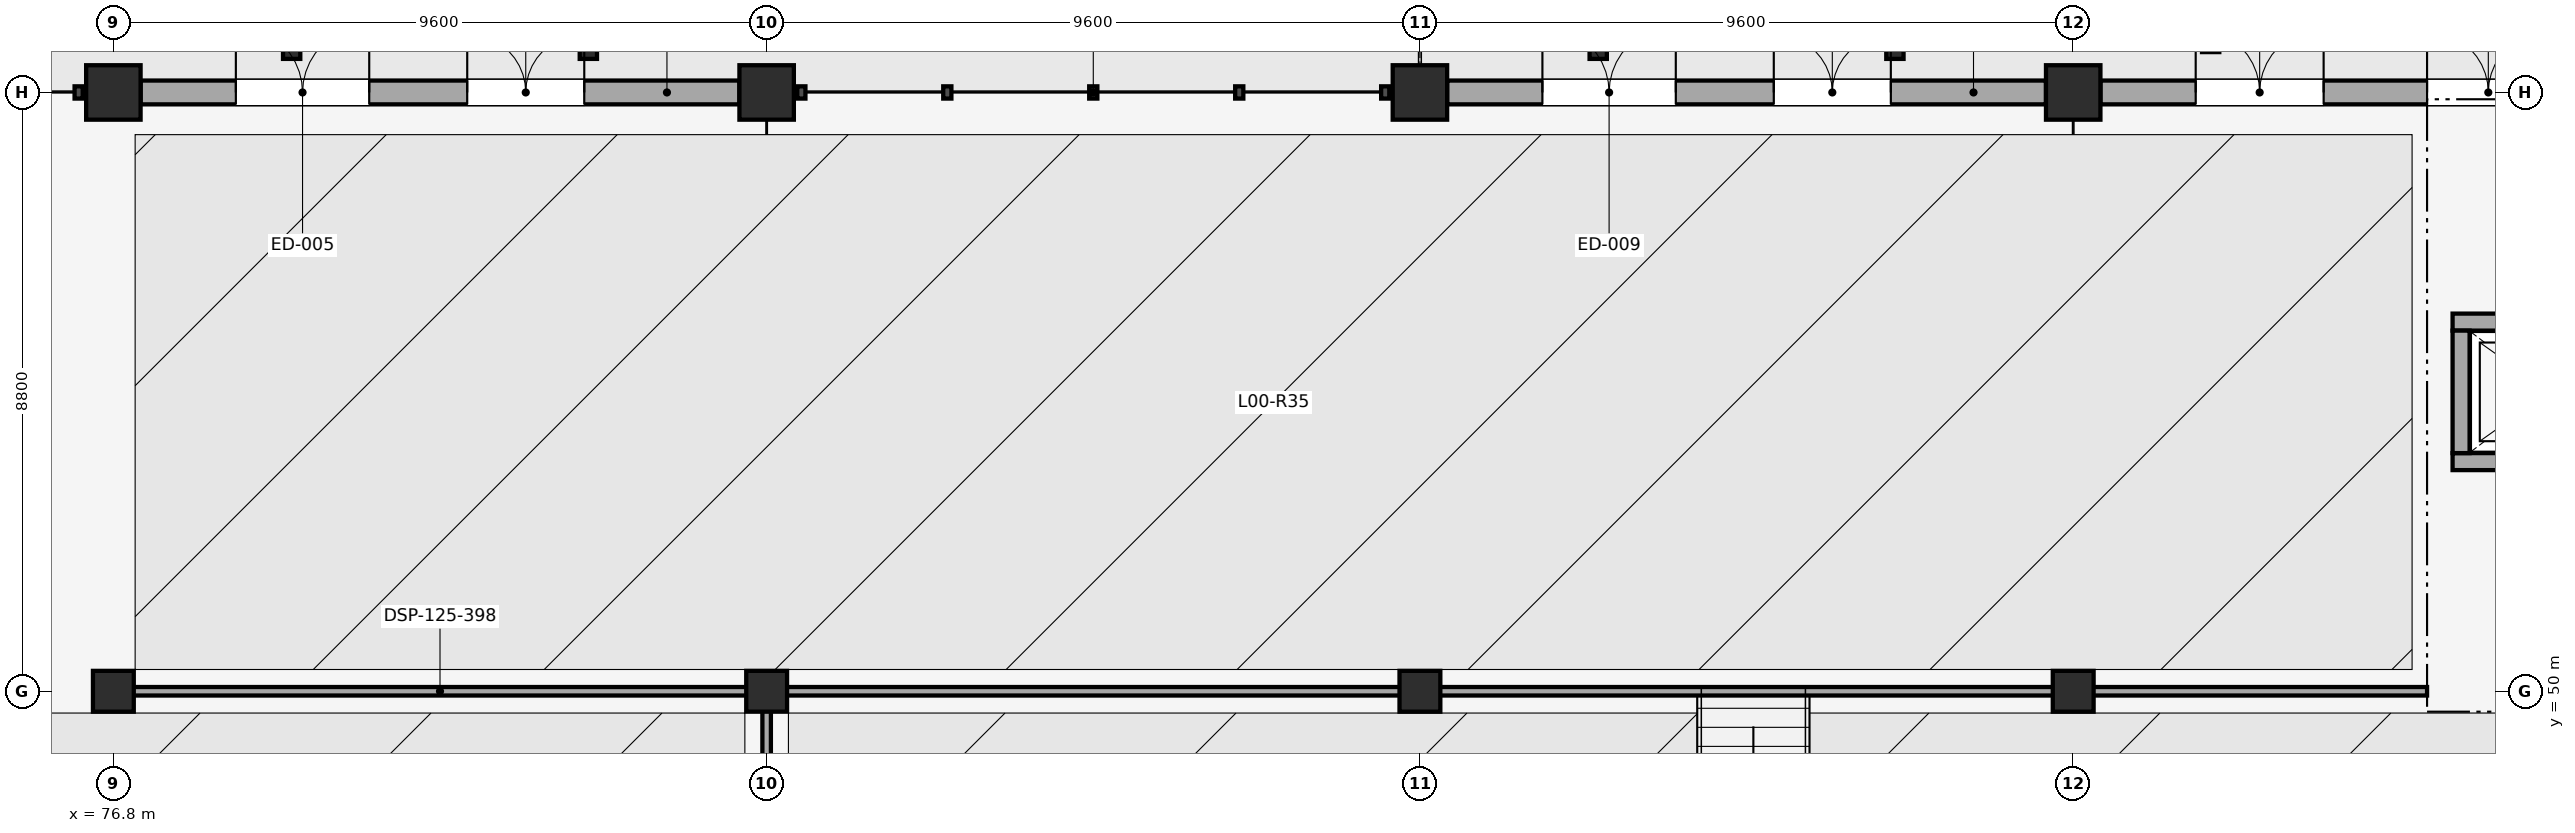
"""IFC4 building model, lengths in metres.
Left out: names, types, materials, properties, quantities, classifications, styles, units other than length and angle.
Written with IfcOpenShell. Run it as: python <this file> out.ifc"""

import sys

from ifc_helpers import new_model, si_unit, direction, frame, frame_2d, origin, origin_2d, place, context, subcontext, project, spatial, rectangle, hollow_rectangle, extrude, element, fill, save


model = new_model("IFC4")
c1 = context("Model", 3, precision=1e-05, world=origin(), true_north=direction((0.0, 1.0)))
c2 = subcontext(c1, "Body", "Model", "MODEL_VIEW")
j1 = project(units=[si_unit("LENGTHUNIT", "METRE"), si_unit("PLANEANGLEUNIT", "RADIAN")], contexts=[c1])
p1 = place(None, origin())
s1 = spatial("IfcSite", under=j1, at=p1, CompositionType="ELEMENT")
p2 = place(p1, origin())
s2 = spatial("IfcBuilding", under=s1, at=p2, CompositionType="ELEMENT")
p3 = place(p2, origin())
s3 = spatial("IfcBuildingStorey", under=s2, at=p3, CompositionType="ELEMENT", Elevation=0.0)
p4 = place(p3, frame((76.8, 50.0, 0.0), z_axis=(0.0, 0.0, 1.0), x_axis=(1.0, 0.0, 0.0)))
e1 = element("IfcColumn", 1, at=p4, inside=s3, PredefinedType="COLUMN", context=c2, shape_type="SweptSolid", body=[
    extrude(rectangle(XDim=0.6, YDim=0.6, at=origin_2d()), origin(), (0.0, 0.0, 1.0), 4.8),
])
p5 = place(p3, frame((76.8, 58.8, 0.0), z_axis=(0.0, 0.0, 1.0), x_axis=(1.0, 0.0, 0.0)))
e2 = element("IfcColumn", 2, at=p5, inside=s3, PredefinedType="COLUMN", context=c2, shape_type="SweptSolid", body=[
    extrude(rectangle(XDim=0.8, YDim=0.8, at=origin_2d()), origin(), (0.0, 0.0, 1.0), 4.8),
])
p6 = place(p3, frame((86.4, 50.0, 0.0), z_axis=(0.0, 0.0, 1.0), x_axis=(1.0, 0.0, 0.0)))
e3 = element("IfcColumn", 3, at=p6, inside=s3, PredefinedType="COLUMN", context=c2, shape_type="SweptSolid", body=[
    extrude(rectangle(XDim=0.6, YDim=0.6, at=origin_2d()), origin(), (0.0, 0.0, 1.0), 4.8),
])
p7 = place(p3, frame((86.4, 58.8, 0.0), z_axis=(0.0, 0.0, 1.0), x_axis=(1.0, 0.0, 0.0)))
e4 = element("IfcColumn", 4, at=p7, inside=s3, PredefinedType="COLUMN", context=c2, shape_type="SweptSolid", body=[
    extrude(rectangle(XDim=0.8, YDim=0.8, at=origin_2d()), origin(), (0.0, 0.0, 1.0), 4.8),
])
p8 = place(p3, frame((96.0, 50.0, 0.0), z_axis=(0.0, 0.0, 1.0), x_axis=(1.0, 0.0, 0.0)))
e5 = element("IfcColumn", 5, at=p8, inside=s3, PredefinedType="COLUMN", context=c2, shape_type="SweptSolid", body=[
    extrude(rectangle(XDim=0.6, YDim=0.6, at=origin_2d()), origin(), (0.0, 0.0, 1.0), 4.8),
])
p9 = place(p3, frame((96.0, 58.8, 0.0), z_axis=(0.0, 0.0, 1.0), x_axis=(1.0, 0.0, 0.0)))
e6 = element("IfcColumn", 6, at=p9, inside=s3, PredefinedType="COLUMN", context=c2, shape_type="SweptSolid", body=[
    extrude(rectangle(XDim=0.8, YDim=0.8, at=origin_2d()), origin(), (0.0, 0.0, 1.0), 4.8),
])
p10 = place(p3, frame((105.6, 50.0, 0.0), z_axis=(0.0, 0.0, 1.0), x_axis=(1.0, 0.0, 0.0)))
e7 = element("IfcColumn", 7, at=p10, inside=s3, PredefinedType="COLUMN", context=c2, shape_type="SweptSolid", body=[
    extrude(rectangle(XDim=0.6, YDim=0.6, at=origin_2d()), origin(), (0.0, 0.0, 1.0), 4.8),
])
p11 = place(p3, frame((105.6, 58.8, 0.0), z_axis=(0.0, 0.0, 1.0), x_axis=(1.0, 0.0, 0.0)))
e8 = element("IfcColumn", 8, at=p11, inside=s3, PredefinedType="COLUMN", context=c2, shape_type="SweptSolid", body=[
    extrude(rectangle(XDim=0.8, YDim=0.8, at=origin_2d()), origin(), (0.0, 0.0, 1.0), 4.8),
])
p12 = place(p3, frame((77.2, 58.8, 0.0), z_axis=(0.0, 0.0, 1.0), x_axis=(1.0, 0.0, 0.0)))
e9 = element("IfcWall", 9, at=p12, inside=s3, PredefinedType="SOLIDWALL", context=c2, shape_type="SweptSolid", body=[
    extrude(rectangle(XDim=8.8, YDim=0.35, at=frame_2d((4.4, 0.0))), origin(), (0.0, 0.0, 1.0), 4.1),
])
p13 = place(p12, frame((1.4, 0.0, 0.0)))
e10 = element("IfcOpeningElement", 10, at=p13, cuts=e9, PredefinedType="OPENING", context=c2, shape_type="SweptSolid", body=[
    extrude(rectangle(XDim=1.96, YDim=2.37, at=frame_2d((0.98, 1.185))), frame((0.0, 0.185, 0.0), z_axis=(0.0, -1.0, 0.0), x_axis=(1.0, 0.0, 0.0)), (0.0, 0.0, 1.0), 0.37),
])
p14 = place(p12, frame((4.8, 0.0, 0.0)))
e11 = element("IfcOpeningElement", 11, at=p14, cuts=e9, PredefinedType="OPENING", context=c2, shape_type="SweptSolid", body=[
    extrude(rectangle(XDim=1.72, YDim=2.34, at=frame_2d((0.86, 1.17))), frame((0.0, 0.185, 0.0), z_axis=(0.0, -1.0, 0.0), x_axis=(1.0, 0.0, 0.0)), (0.0, 0.0, 1.0), 0.37),
])
p15 = place(p3, frame((96.4, 58.8, 0.0), z_axis=(0.0, 0.0, 1.0), x_axis=(1.0, 0.0, 0.0)))
e12 = element("IfcWall", 12, at=p15, inside=s3, PredefinedType="SOLIDWALL", context=c2, shape_type="SweptSolid", body=[
    extrude(rectangle(XDim=8.8, YDim=0.35, at=frame_2d((4.4, 0.0))), origin(), (0.0, 0.0, 1.0), 4.1),
])
p16 = place(p15, frame((1.4, 0.0, 0.0)))
e13 = element("IfcOpeningElement", 13, at=p16, cuts=e12, PredefinedType="OPENING", context=c2, shape_type="SweptSolid", body=[
    extrude(rectangle(XDim=1.96, YDim=2.37, at=frame_2d((0.98, 1.185))), frame((0.0, 0.185, 0.0), z_axis=(0.0, -1.0, 0.0), x_axis=(1.0, 0.0, 0.0)), (0.0, 0.0, 1.0), 0.37),
])
p17 = place(p15, frame((4.8, 0.0, 0.0)))
e14 = element("IfcOpeningElement", 14, at=p17, cuts=e12, PredefinedType="OPENING", context=c2, shape_type="SweptSolid", body=[
    extrude(rectangle(XDim=1.72, YDim=2.34, at=frame_2d((0.86, 1.17))), frame((0.0, 0.185, 0.0), z_axis=(0.0, -1.0, 0.0), x_axis=(1.0, 0.0, 0.0)), (0.0, 0.0, 1.0), 0.37),
])
p18 = place(p3, frame((106.0, 58.8, 0.0), z_axis=(0.0, 0.0, 1.0), x_axis=(1.0, 0.0, 0.0)))
e15 = element("IfcWall", 15, at=p18, inside=s3, PredefinedType="SOLIDWALL", context=c2, shape_type="SweptSolid", body=[
    extrude(rectangle(XDim=8.8, YDim=0.35, at=frame_2d((4.4, 0.0))), origin(), (0.0, 0.0, 1.0), 4.1),
])
p19 = place(p18, frame((1.4, 0.0, 0.0)))
e16 = element("IfcOpeningElement", 16, at=p19, cuts=e15, PredefinedType="OPENING", context=c2, shape_type="SweptSolid", body=[
    extrude(rectangle(XDim=1.88, YDim=2.31, at=frame_2d((0.94, 1.155))), frame((0.0, 0.185, 0.0), z_axis=(0.0, -1.0, 0.0), x_axis=(1.0, 0.0, 0.0)), (0.0, 0.0, 1.0), 0.37),
])
p20 = place(p18, frame((4.8, 0.0, 0.0)))
e17 = element("IfcOpeningElement", 17, at=p20, cuts=e15, PredefinedType="OPENING", context=c2, shape_type="SweptSolid", body=[
    extrude(rectangle(XDim=1.8, YDim=2.4, at=frame_2d((0.9, 1.2))), frame((0.0, 0.185, 0.0), z_axis=(0.0, -1.0, 0.0), x_axis=(1.0, 0.0, 0.0)), (0.0, 0.0, 1.0), 0.37),
])
for number, where, z_axis, x_axis in (
    (18, (79.42, 59.42, 0.0), (0.0, 0.0, 1.0), (1.0, 0.0, 0.0)),
    (19, (83.78, 59.42, 0.0), (0.0, 0.0, 1.0), (1.0, 0.0, 0.0)),
    (20, (98.62, 59.42, 0.0), (0.0, 0.0, 1.0), (1.0, 0.0, 0.0)),
    (21, (102.98, 59.42, 0.0), (0.0, 0.0, 1.0), (1.0, 0.0, 0.0)),
):
    element("IfcColumn", number, at=place(p3, frame(where, z_axis=z_axis, x_axis=x_axis)), inside=s3, PredefinedType="COLUMN", context=c2, shape_type="SweptSolid", body=[
        extrude(hollow_rectangle(XDim=0.254, YDim=0.254, WallThickness=0.012, at=origin_2d()), origin(), (0.0, 0.0, 1.0), 3.47),
    ])
p21 = place(p3, frame((107.62, 59.52, 0.0), z_axis=(0.0, 0.0, 1.0), x_axis=(1.0, 0.0, 0.0)))
e22 = element("IfcColumn", 22, at=p21, inside=s3, PredefinedType="COLUMN", context=c2, shape_type="SweptSolid", body=[
    extrude(hollow_rectangle(XDim=0.254, YDim=0.254, WallThickness=0.012, at=origin_2d()), origin(), (0.0, 0.0, 1.0), 3.56),
])
p22 = place(p3, frame((114.025, 53.375, 0.0), z_axis=(0.0, 0.0, 1.0), x_axis=(-1.0, 0.0, 0.0)))
e23 = element("IfcWall", 23, at=p22, inside=s3, PredefinedType="SOLIDWALL", context=c2, shape_type="SweptSolid", body=[
    extrude(rectangle(XDim=2.85, YDim=0.25, at=frame_2d((1.425, 0.0))), origin(), (0.0, 0.0, 1.0), 4.55),
])
p23 = place(p22, frame((0.875, 0.0, 0.0)))
e24 = element("IfcOpeningElement", 24, at=p23, cuts=e23, PredefinedType="OPENING", context=c2, shape_type="SweptSolid", body=[
    extrude(rectangle(XDim=1.1, YDim=2.15, at=frame_2d((0.55, 1.075))), frame((0.0, 0.135, 0.0), z_axis=(0.0, -1.0, 0.0), x_axis=(1.0, 0.0, 0.0)), (0.0, 0.0, 1.0), 0.27),
])
p24 = place(p3, frame((111.175, 55.425, 0.0), z_axis=(0.0, 0.0, 1.0), x_axis=(1.0, 0.0, 0.0)))
e25 = element("IfcWall", 25, at=p24, inside=s3, PredefinedType="SOLIDWALL", context=c2, shape_type="SweptSolid", body=[
    extrude(rectangle(XDim=2.85, YDim=0.25, at=frame_2d((1.425, 0.0))), origin(), (0.0, 0.0, 1.0), 4.55),
])
p25 = place(p3, frame((111.3, 53.5, 0.0), z_axis=(0.0, 0.0, 1.0), x_axis=(0.0, 1.0, 0.0)))
e26 = element("IfcWall", 26, at=p25, inside=s3, PredefinedType="SOLIDWALL", context=c2, shape_type="SweptSolid", body=[
    extrude(rectangle(XDim=1.8, YDim=0.25, at=frame_2d((0.9, 0.0))), origin(), (0.0, 0.0, 1.0), 4.55),
])
p26 = place(p3, frame((86.4, 32.5, 0.0), z_axis=(0.0, 0.0, 1.0), x_axis=(0.0, 1.0, 0.0)))
e27 = element("IfcWall", 27, at=p26, inside=s3, PredefinedType="PARTITIONING", context=c2, shape_type="SweptSolid", body=[
    extrude(rectangle(XDim=17.45, YDim=0.125, at=frame_2d((8.725, 0.0))), origin(), (0.0, 0.0, 1.0), 4.42),
])
p27 = place(p3, frame((76.9, 50.0, 0.0), z_axis=(0.0, 0.0, 1.0), x_axis=(1.0, 0.0, 0.0)))
e28 = element("IfcWall", 28, at=p27, inside=s3, PredefinedType="PARTITIONING", context=c2, shape_type="SweptSolid", body=[
    extrude(rectangle(XDim=9.4, YDim=0.125, at=frame_2d((4.7, 0.0))), origin(), (0.0, 0.0, 1.0), 3.925),
])
p28 = place(p3, frame((86.5, 50.0, 0.0), z_axis=(0.0, 0.0, 1.0), x_axis=(1.0, 0.0, 0.0)))
e29 = element("IfcWall", 29, at=p28, inside=s3, PredefinedType="PARTITIONING", context=c2, shape_type="SweptSolid", body=[
    extrude(rectangle(XDim=24.3, YDim=0.125, at=frame_2d((12.15, 0.0))), origin(), (0.0, 0.0, 1.0), 3.925),
])
p29 = place(p13, origin())
e30 = element("IfcDoor", 30, at=p29, inside=s3, OperationType="DOUBLE_DOOR_SINGLE_SWING", PredefinedType="DOOR", context=c2, shape_type="SweptSolid", body=[
    extrude(rectangle(XDim=1.96, YDim=2.37, at=frame_2d((0.98, 1.185))), frame((0.0, 0.025, 0.0), z_axis=(0.0, -1.0, 0.0), x_axis=(1.0, 0.0, 0.0)), (0.0, 0.0, 1.0), 0.05),
])
fill(e10, e30)
p30 = place(p14, origin())
e31 = element("IfcDoor", 31, at=p30, inside=s3, OperationType="DOUBLE_DOOR_SINGLE_SWING", PredefinedType="DOOR", context=c2, shape_type="SweptSolid", body=[
    extrude(rectangle(XDim=1.72, YDim=2.34, at=frame_2d((0.86, 1.17))), frame((0.0, 0.025, 0.0), z_axis=(0.0, -1.0, 0.0), x_axis=(1.0, 0.0, 0.0)), (0.0, 0.0, 1.0), 0.05),
])
fill(e11, e31)
p31 = place(p16, origin())
e32 = element("IfcDoor", 32, at=p31, inside=s3, OperationType="DOUBLE_DOOR_SINGLE_SWING", PredefinedType="DOOR", context=c2, shape_type="SweptSolid", body=[
    extrude(rectangle(XDim=1.96, YDim=2.37, at=frame_2d((0.98, 1.185))), frame((0.0, 0.025, 0.0), z_axis=(0.0, -1.0, 0.0), x_axis=(1.0, 0.0, 0.0)), (0.0, 0.0, 1.0), 0.05),
])
fill(e13, e32)
p32 = place(p17, origin())
e33 = element("IfcDoor", 33, at=p32, inside=s3, OperationType="DOUBLE_DOOR_SINGLE_SWING", PredefinedType="DOOR", context=c2, shape_type="SweptSolid", body=[
    extrude(rectangle(XDim=1.72, YDim=2.34, at=frame_2d((0.86, 1.17))), frame((0.0, 0.025, 0.0), z_axis=(0.0, -1.0, 0.0), x_axis=(1.0, 0.0, 0.0)), (0.0, 0.0, 1.0), 0.05),
])
fill(e14, e33)
p33 = place(p19, origin())
e34 = element("IfcDoor", 34, at=p33, inside=s3, OperationType="DOUBLE_DOOR_SINGLE_SWING", PredefinedType="DOOR", context=c2, shape_type="SweptSolid", body=[
    extrude(rectangle(XDim=1.88, YDim=2.31, at=frame_2d((0.94, 1.155))), frame((0.0, 0.025, 0.0), z_axis=(0.0, -1.0, 0.0), x_axis=(1.0, 0.0, 0.0)), (0.0, 0.0, 1.0), 0.05),
])
fill(e16, e34)
p34 = place(p20, origin())
e35 = element("IfcDoor", 35, at=p34, inside=s3, OperationType="DOUBLE_DOOR_SINGLE_SWING", PredefinedType="DOOR", context=c2, shape_type="SweptSolid", body=[
    extrude(rectangle(XDim=1.8, YDim=2.4, at=frame_2d((0.9, 1.2))), frame((0.0, 0.025, 0.0), z_axis=(0.0, -1.0, 0.0), x_axis=(1.0, 0.0, 0.0)), (0.0, 0.0, 1.0), 0.05),
])
fill(e17, e35)
save(model, sys.argv[1])
